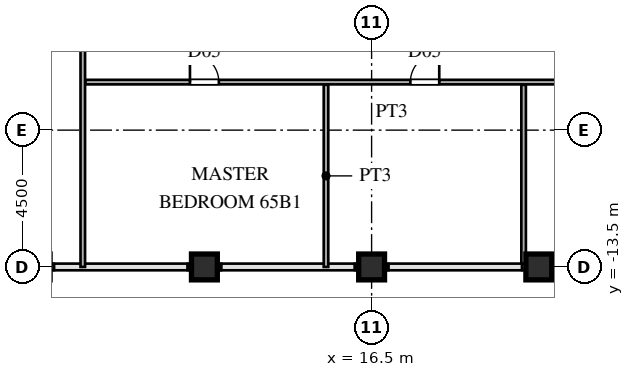
"""IFC4 building model, lengths in metres.
Left out: names, types, materials, properties, quantities, classifications, styles, units other than length and angle.
Written with IfcOpenShell. Run it as: python <this file> out.ifc"""

import sys

from ifc_helpers import new_model, si_unit, direction, frame, frame_2d, origin, origin_2d, place, context, subcontext, project, spatial, rectangle, hollow_rectangle, extrude, source, transform, mapped, element, fill, save


model = new_model("IFC4")
c1 = context("Model", 3, precision=1e-05, world=origin(), true_north=direction((0.0, 1.0)))
c2 = subcontext(c1, "Body", "Model", "MODEL_VIEW")
j1 = project(units=[si_unit("LENGTHUNIT", "METRE"), si_unit("PLANEANGLEUNIT", "RADIAN")], contexts=[c1])
p1 = place(None, origin())
s1 = spatial("IfcSite", under=j1, at=p1, CompositionType="ELEMENT")
p2 = place(p1, origin())
s2 = spatial("IfcBuilding", under=s1, at=p2, CompositionType="ELEMENT")
p3 = place(p2, frame((0.0, 0.0, 246.9)))
s3 = spatial("IfcBuildingStorey", under=s2, at=p3, CompositionType="ELEMENT", Elevation=246.9)
m1 = source(origin(), c2, "Body", "SweptSolid", [
    extrude(hollow_rectangle(XDim=0.85, YDim=0.85, WallThickness=0.036, at=origin_2d()), origin(), (0.0, 0.0, 1.0), 3.75),
])
for number, where, z_axis, x_axis in (
    (1, (11.0, -13.5, 0.0), (0.0, 0.0, 1.0), (1.0, 0.0, 0.0)),
    (2, (16.5, -13.5, 0.0), (0.0, 0.0, 1.0), (1.0, 0.0, 0.0)),
    (3, (22.0, -13.5, 0.0), (0.0, 0.0, 1.0), (1.0, 0.0, 0.0)),
):
    element("IfcColumn", number, at=place(p3, frame(where, z_axis=z_axis, x_axis=x_axis)), inside=s3, PredefinedType="COLUMN", context=c2, shape_type="MappedRepresentation", body=[
        mapped(m1, transform((0.0, 0.0, 0.0), scale=1.0)),
    ])
for number, where, z_axis, x_axis in (
    (4, (4.95, -13.5, 0.0), (0.0, 0.0, 1.0), (1.0, 0.0, 0.0)),
    (5, (10.45, -13.5, 0.0), (0.0, 0.0, 1.0), (1.0, 0.0, 0.0)),
    (6, (15.95, -13.5, 0.0), (0.0, 0.0, 1.0), (1.0, 0.0, 0.0)),
    (7, (21.45, -13.5, 0.0), (0.0, 0.0, 1.0), (1.0, 0.0, 0.0)),
):
    element("IfcWall", number, at=place(p3, frame(where, z_axis=z_axis, x_axis=x_axis)), inside=s3, PredefinedType="SOLIDWALL", context=c2, shape_type="SweptSolid", body=[
        extrude(rectangle(XDim=1.1, YDim=0.21, at=frame_2d((0.55, 0.0))), origin(), (0.0, 0.0, 1.0), 3.03),
    ])
p4 = place(p3, frame((7.085, -7.42, 0.0), z_axis=(0.0, 0.0, 1.0), x_axis=(1.0, 0.0, 0.0)))
e8 = element("IfcWall", 8, at=p4, inside=s3, PredefinedType="PARTITIONING", context=c2, shape_type="SweptSolid", body=[
    extrude(rectangle(XDim=20.16, YDim=0.15, at=frame_2d((10.08, 0.0))), origin(), (0.0, 0.0, 1.0), 3.53),
])
p5 = place(p4, frame((3.44, 0.0, 0.0)))
e9 = element("IfcOpeningElement", 9, at=p5, cuts=e8, PredefinedType="OPENING", context=c2, shape_type="SweptSolid", body=[
    extrude(rectangle(XDim=0.95, YDim=2.15, at=frame_2d((0.475, 1.075))), frame((0.0, 0.085, 0.0), z_axis=(0.0, -1.0, 0.0), x_axis=(1.0, 0.0, 0.0)), (0.0, 0.0, 1.0), 0.17),
])
p6 = place(p4, frame((10.69, 0.0, 0.0)))
e10 = element("IfcOpeningElement", 10, at=p6, cuts=e8, PredefinedType="OPENING", context=c2, shape_type="SweptSolid", body=[
    extrude(rectangle(XDim=0.95, YDim=2.15, at=frame_2d((0.475, 1.075))), frame((0.0, 0.085, 0.0), z_axis=(0.0, -1.0, 0.0), x_axis=(1.0, 0.0, 0.0)), (0.0, 0.0, 1.0), 0.17),
])
p7 = place(p4, frame((16.94, 0.0, 0.0)))
e11 = element("IfcOpeningElement", 11, at=p7, cuts=e8, PredefinedType="OPENING", context=c2, shape_type="SweptSolid", body=[
    extrude(rectangle(XDim=0.95, YDim=2.15, at=frame_2d((0.475, 1.075))), frame((0.0, 0.085, 0.0), z_axis=(0.0, -1.0, 0.0), x_axis=(1.0, 0.0, 0.0)), (0.0, 0.0, 1.0), 0.17),
])
p8 = place(p3, frame((7.0, -13.5, 0.0), z_axis=(0.0, 0.0, 1.0), x_axis=(0.0, 1.0, 0.0)))
e12 = element("IfcWall", 12, at=p8, inside=s3, PredefinedType="PARTITIONING", context=c2, shape_type="SweptSolid", body=[
    extrude(rectangle(XDim=12.065, YDim=0.15, at=frame_2d((6.032, 0.0))), origin(), (0.0, 0.0, 1.0), 3.53),
])
p9 = place(p8, frame((7.587, 0.0, 0.0)))
e13 = element("IfcOpeningElement", 13, at=p9, cuts=e12, PredefinedType="OPENING", context=c2, shape_type="SweptSolid", body=[
    extrude(rectangle(XDim=0.95, YDim=2.15, at=frame_2d((0.475, 1.075))), frame((0.0, 0.085, 0.0), z_axis=(0.0, -1.0, 0.0), x_axis=(1.0, 0.0, 0.0)), (0.0, 0.0, 1.0), 0.17),
])
p10 = place(p3, frame((15.0, -13.5, 0.0), z_axis=(0.0, 0.0, 1.0), x_axis=(0.0, 1.0, 0.0)))
e14 = element("IfcWall", 14, at=p10, inside=s3, PredefinedType="PARTITIONING", context=c2, shape_type="SweptSolid", body=[
    extrude(rectangle(XDim=5.99, YDim=0.15, at=frame_2d((2.995, 0.0))), origin(), (0.0, 0.0, 1.0), 3.53),
])
p11 = place(p3, frame((21.5, -13.39, 0.0), z_axis=(0.0, 0.0, 1.0), x_axis=(0.0, 1.0, 0.0)))
e15 = element("IfcWall", 15, at=p11, inside=s3, PredefinedType="PARTITIONING", context=c2, shape_type="SweptSolid", body=[
    extrude(rectangle(XDim=5.88, YDim=0.15, at=frame_2d((2.94, 0.0))), origin(), (0.0, 0.0, 1.0), 3.53),
])
m2 = source(origin(), c2, "Body", "SweptSolid", [
    extrude(rectangle(XDim=0.95, YDim=2.15, at=frame_2d((0.475, 1.075))), frame((0.0, 0.025, 0.0), z_axis=(0.0, -1.0, 0.0), x_axis=(1.0, 0.0, 0.0)), (0.0, 0.0, 1.0), 0.05),
])
p12 = place(p5, origin())
e16 = element("IfcDoor", 16, at=p12, inside=s3, OperationType="SINGLE_SWING_LEFT", PredefinedType="DOOR", context=c2, shape_type="MappedRepresentation", body=[
    mapped(m2, transform((0.0, 0.0, 0.0), scale=1.0)),
])
fill(e9, e16)
p13 = place(p6, origin())
e17 = element("IfcDoor", 17, at=p13, inside=s3, OperationType="SINGLE_SWING_RIGHT", PredefinedType="DOOR", context=c2, shape_type="MappedRepresentation", body=[
    mapped(m2, transform((0.0, 0.0, 0.0), scale=1.0)),
])
fill(e10, e17)
save(model, sys.argv[1])
